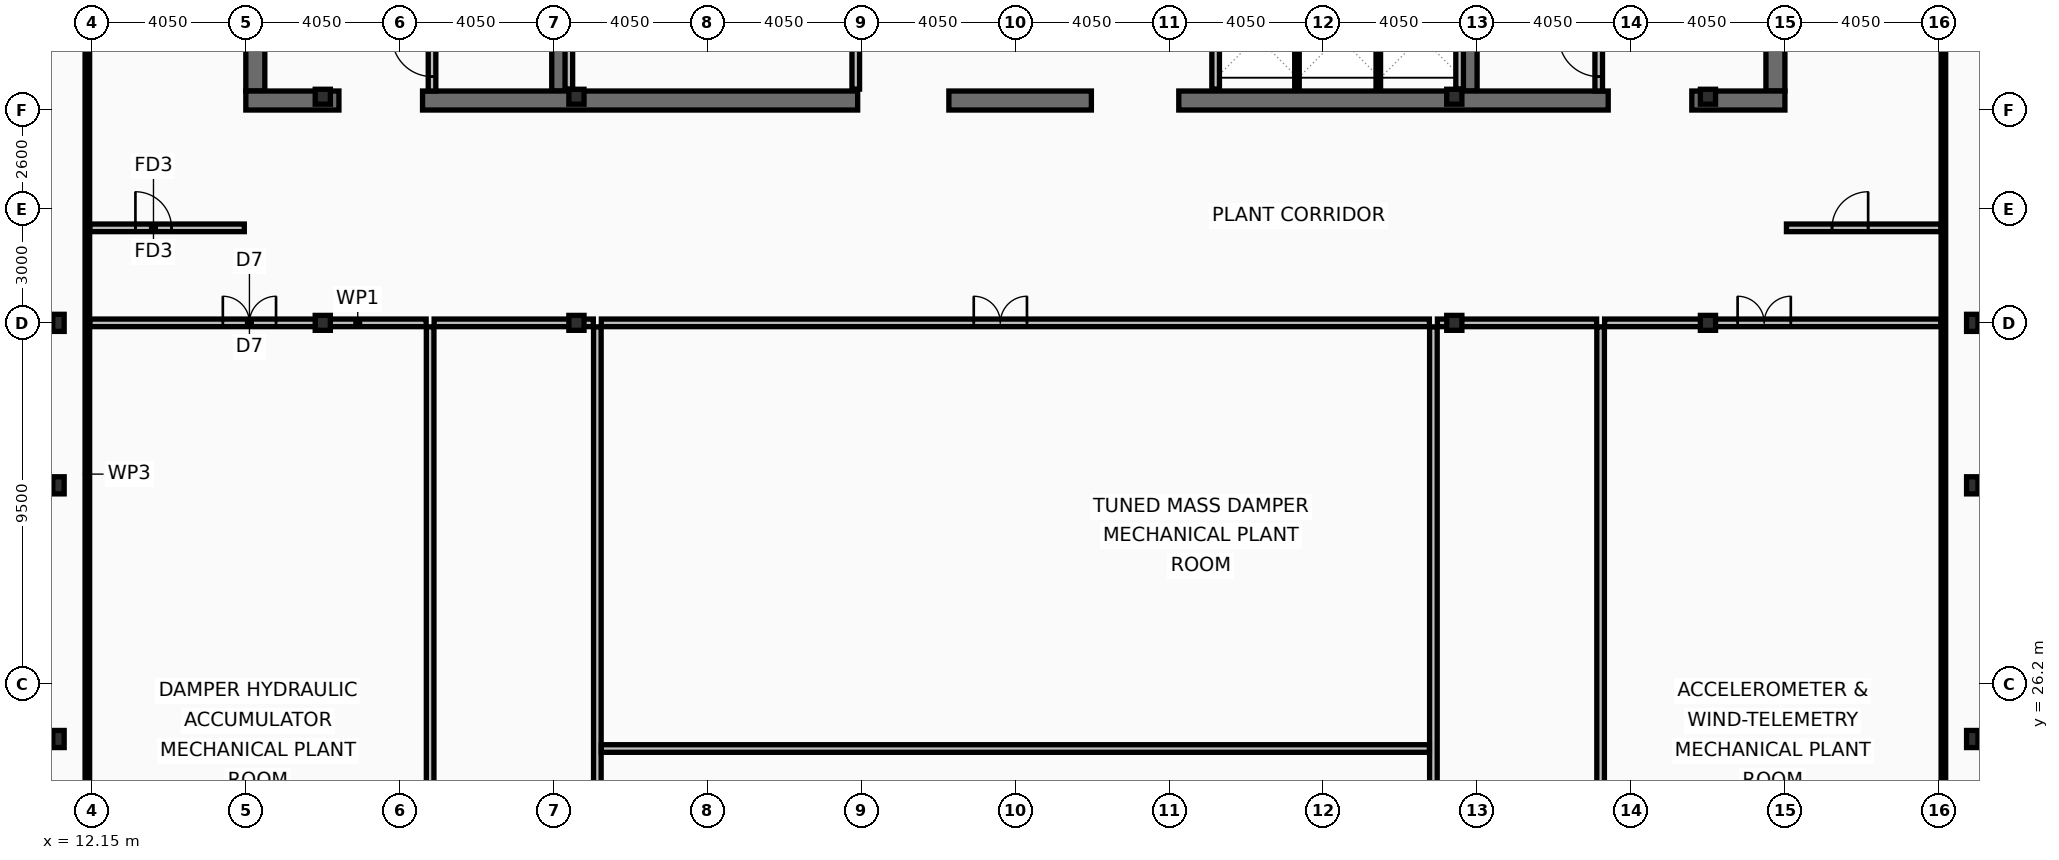
"""IFC4 building model, lengths in metres.
Left out: names, types, materials, properties, quantities, classifications, styles, units other than length and angle.
Written with IfcOpenShell. Run it as: python <this file> out.ifc"""

import sys

from ifc_helpers import new_model, si_unit, direction, frame, frame_2d, origin, origin_2d, place, context, subcontext, project, spatial, rectangle, i_section, extrude, element, fill, save


model = new_model("IFC4")
c1 = context("Model", 3, precision=1e-05, world=origin(), true_north=direction((0.0, 1.0)))
c2 = subcontext(c1, "Body", "Model", "MODEL_VIEW")
j1 = project(units=[si_unit("LENGTHUNIT", "METRE"), si_unit("PLANEANGLEUNIT", "RADIAN")], contexts=[c1])
p1 = place(None, origin())
s1 = spatial("IfcSite", under=j1, at=p1, CompositionType="ELEMENT")
p2 = place(p1, origin())
s2 = spatial("IfcBuilding", under=s1, at=p2, CompositionType="ELEMENT")
p3 = place(p2, frame((0.0, 0.0, 350.6)))
s3 = spatial("IfcBuildingStorey", under=s2, at=p3, CompositionType="ELEMENT", Elevation=350.6)
for number, where, z_axis, x_axis in (
    (1, (16.45, 41.8, 0.0), (0.0, 0.0, 1.0), (0.0, 1.0, 0.0)),
    (2, (56.45, 53.2, 0.0), (0.0, 0.0, 1.0), (0.0, -1.0, 0.0)),
):
    element("IfcWall", number, at=place(p3, frame(where, z_axis=z_axis, x_axis=x_axis)), inside=s3, PredefinedType="SHEAR", context=c2, shape_type="SweptSolid", body=[
        extrude(rectangle(XDim=11.4, YDim=0.5, at=frame_2d((5.7, 0.0))), origin(), (0.0, 0.0, 1.0), 5.4),
    ])
for number, where, z_axis, x_axis in (
    (3, (24.45, 41.8, 0.0), (0.0, 0.0, 1.0), (0.0, 1.0, 0.0)),
    (4, (48.4, 41.8, 0.0), (0.0, 0.0, 1.0), (0.0, 1.0, 0.0)),
):
    element("IfcWall", number, at=place(p3, frame(where, z_axis=z_axis, x_axis=x_axis)), inside=s3, PredefinedType="SHEAR", context=c2, shape_type="SweptSolid", body=[
        extrude(rectangle(XDim=11.4, YDim=0.4, at=frame_2d((5.7, 0.0))), origin(), (0.0, 0.0, 1.0), 5.4),
    ])
p4 = place(p3, frame((18.65, 41.55, 0.0), z_axis=(0.0, 0.0, 1.0), x_axis=(-1.0, 0.0, 0.0)))
e5 = element("IfcWall", 5, at=p4, inside=s3, PredefinedType="SHEAR", context=c2, shape_type="SweptSolid", body=[
    extrude(rectangle(XDim=2.45, YDim=0.5, at=frame_2d((1.225, 0.0))), origin(), (0.0, 0.0, 1.0), 5.4),
])
p5 = place(p3, frame((32.3, 41.55, 0.0), z_axis=(0.0, 0.0, 1.0), x_axis=(-1.0, 0.0, 0.0)))
e6 = element("IfcWall", 6, at=p5, inside=s3, PredefinedType="SHEAR", context=c2, shape_type="SweptSolid", body=[
    extrude(rectangle(XDim=11.45, YDim=0.5, at=frame_2d((5.725, 0.0))), origin(), (0.0, 0.0, 1.0), 5.4),
])
p6 = place(p3, frame((38.45, 41.55, 0.0), z_axis=(0.0, 0.0, 1.0), x_axis=(-1.0, 0.0, 0.0)))
e7 = element("IfcWall", 7, at=p6, inside=s3, PredefinedType="SHEAR", context=c2, shape_type="SweptSolid", body=[
    extrude(rectangle(XDim=3.75, YDim=0.5, at=frame_2d((1.875, 0.0))), origin(), (0.0, 0.0, 1.0), 5.4),
])
p7 = place(p3, frame((52.05, 41.55, 0.0), z_axis=(0.0, 0.0, 1.0), x_axis=(-1.0, 0.0, 0.0)))
e8 = element("IfcWall", 8, at=p7, inside=s3, PredefinedType="SHEAR", context=c2, shape_type="SweptSolid", body=[
    extrude(rectangle(XDim=11.3, YDim=0.5, at=frame_2d((5.65, 0.0))), origin(), (0.0, 0.0, 1.0), 5.4),
])
p8 = place(p3, frame((56.7, 41.55, 0.0), z_axis=(0.0, 0.0, 1.0), x_axis=(-1.0, 0.0, 0.0)))
e9 = element("IfcWall", 9, at=p8, inside=s3, PredefinedType="SHEAR", context=c2, shape_type="SweptSolid", body=[
    extrude(rectangle(XDim=2.45, YDim=0.5, at=frame_2d((1.225, 0.0))), origin(), (0.0, 0.0, 1.0), 5.4),
])
for number, where, z_axis, x_axis in (
    (10, (11.27, 24.75, 0.0), (0.0, 0.0, 1.0), (1.0, 0.0, 0.0)),
    (11, (11.27, 31.425, 0.0), (0.0, 0.0, 1.0), (1.0, 0.0, 0.0)),
    (12, (11.27, 35.7, 0.0), (0.0, 0.0, 1.0), (1.0, 0.0, 0.0)),
    (13, (61.63, 24.75, 0.0), (0.0, 0.0, 1.0), (1.0, 0.0, 0.0)),
    (14, (61.63, 31.425, 0.0), (0.0, 0.0, 1.0), (1.0, 0.0, 0.0)),
    (15, (61.63, 35.7, 0.0), (0.0, 0.0, 1.0), (1.0, 0.0, 0.0)),
):
    element("IfcColumn", number, at=place(p3, frame(where, z_axis=z_axis, x_axis=x_axis)), inside=s3, PredefinedType="COLUMN", context=c2, shape_type="SweptSolid", body=[
        extrude(i_section(OverallWidth=0.3, OverallDepth=0.45, WebThickness=0.014, FlangeThickness=0.026, at=origin_2d()), origin(), (0.0, 0.0, 1.0), 5.6),
    ])
for number, where, z_axis, x_axis in (
    (16, (18.225, 35.7, 0.0), (0.0, 0.0, 1.0), (1.0, 0.0, 0.0)),
    (17, (18.225, 41.65, 0.0), (0.0, 0.0, 1.0), (1.0, 0.0, 0.0)),
    (18, (24.9, 35.7, 0.0), (0.0, 0.0, 1.0), (1.0, 0.0, 0.0)),
    (19, (24.9, 41.65, 0.0), (0.0, 0.0, 1.0), (1.0, 0.0, 0.0)),
    (20, (48.0, 35.7, 0.0), (0.0, 0.0, 1.0), (1.0, 0.0, 0.0)),
    (21, (48.0, 41.65, 0.0), (0.0, 0.0, 1.0), (1.0, 0.0, 0.0)),
    (22, (54.675, 35.7, 0.0), (0.0, 0.0, 1.0), (1.0, 0.0, 0.0)),
    (23, (54.675, 41.65, 0.0), (0.0, 0.0, 1.0), (1.0, 0.0, 0.0)),
):
    element("IfcColumn", number, at=place(p3, frame(where, z_axis=z_axis, x_axis=x_axis)), inside=s3, PredefinedType="COLUMN", context=c2, shape_type="SweptSolid", body=[
        extrude(i_section(OverallWidth=0.399, OverallDepth=0.393, WebThickness=0.023, FlangeThickness=0.037, at=origin_2d()), origin(), (0.0, 0.0, 1.0), 5.6),
    ])
p9 = place(p3, frame((21.1, 41.8, 0.0), z_axis=(0.0, 0.0, 1.0), x_axis=(0.0, 1.0, 0.0)))
e24 = element("IfcWall", 24, at=p9, inside=s3, PredefinedType="PARTITIONING", context=c2, shape_type="SweptSolid", body=[
    extrude(rectangle(XDim=2.695, YDim=0.2, at=frame_2d((1.348, 0.0))), origin(), (0.0, 0.0, 1.0), 5.4),
])
p10 = place(p9, frame((0.38, 0.0, 0.0)))
e25 = element("IfcOpeningElement", 25, at=p10, cuts=e24, PredefinedType="OPENING", context=c2, shape_type="SweptSolid", body=[
    extrude(rectangle(XDim=1.05, YDim=2.15, at=frame_2d((0.525, 1.075))), frame((0.0, 0.11, 0.0), z_axis=(0.0, -1.0, 0.0), x_axis=(1.0, 0.0, 0.0)), (0.0, 0.0, 1.0), 0.22),
])
p11 = place(p3, frame((51.8, 41.8, 0.0), z_axis=(0.0, 0.0, 1.0), x_axis=(0.0, 1.0, 0.0)))
e26 = element("IfcWall", 26, at=p11, inside=s3, PredefinedType="PARTITIONING", context=c2, shape_type="SweptSolid", body=[
    extrude(rectangle(XDim=2.695, YDim=0.2, at=frame_2d((1.348, 0.0))), origin(), (0.0, 0.0, 1.0), 5.4),
])
p12 = place(p11, frame((0.38, 0.0, 0.0)))
e27 = element("IfcOpeningElement", 27, at=p12, cuts=e26, PredefinedType="OPENING", context=c2, shape_type="SweptSolid", body=[
    extrude(rectangle(XDim=1.05, YDim=2.15, at=frame_2d((0.525, 1.075))), frame((0.0, 0.11, 0.0), z_axis=(0.0, -1.0, 0.0), x_axis=(1.0, 0.0, 0.0)), (0.0, 0.0, 1.0), 0.22),
])
for number, where, z_axis, x_axis in (
    (28, (24.7, 41.85, 0.0), (0.0, 0.0, 1.0), (0.0, 1.0, 0.0)),
    (29, (32.25, 41.85, 0.0), (0.0, 0.0, 1.0), (0.0, 1.0, 0.0)),
    (30, (41.72, 41.85, 0.0), (0.0, 0.0, 1.0), (0.0, 1.0, 0.0)),
    (31, (48.14, 41.85, 0.0), (0.0, 0.0, 1.0), (0.0, 1.0, 0.0)),
):
    element("IfcWall", number, at=place(p3, frame(where, z_axis=z_axis, x_axis=x_axis)), inside=s3, PredefinedType="PARTITIONING", context=c2, shape_type="SweptSolid", body=[
        extrude(rectangle(XDim=2.395, YDim=0.2, at=frame_2d((1.198, 0.0))), origin(), (0.0, 0.0, 1.0), 5.4),
    ])
for number, where, z_axis, x_axis in (
    (32, (43.86, 41.85, 0.0), (0.0, 0.0, 1.0), (0.0, 1.0, 0.0)),
    (33, (46.0, 41.85, 0.0), (0.0, 0.0, 1.0), (0.0, 1.0, 0.0)),
):
    element("IfcWall", number, at=place(p3, frame(where, z_axis=z_axis, x_axis=x_axis)), inside=s3, PredefinedType="PARTITIONING", context=c2, shape_type="SweptSolid", body=[
        extrude(rectangle(XDim=2.395, YDim=0.12, at=frame_2d((1.198, 0.0))), origin(), (0.0, 0.0, 1.0), 5.4),
    ])
p13 = place(p3, frame((12.095, 35.7, 0.0), z_axis=(0.0, 0.0, 1.0), x_axis=(1.0, 0.0, 0.0)))
e34 = element("IfcWall", 34, at=p13, inside=s3, PredefinedType="PARTITIONING", context=c2, shape_type="SweptSolid", body=[
    extrude(rectangle(XDim=8.85, YDim=0.2, at=frame_2d((4.425, 0.0))), origin(), (0.0, 0.0, 1.0), 4.79),
])
p14 = place(p13, frame((3.5, 0.0, 0.0)))
e35 = element("IfcOpeningElement", 35, at=p14, cuts=e34, PredefinedType="OPENING", context=c2, shape_type="SweptSolid", body=[
    extrude(rectangle(XDim=1.4, YDim=2.15, at=frame_2d((0.7, 1.075))), frame((0.0, 0.11, 0.0), z_axis=(0.0, -1.0, 0.0), x_axis=(1.0, 0.0, 0.0)), (0.0, 0.0, 1.0), 0.22),
])
p15 = place(p3, frame((21.155, 35.7, 0.0), z_axis=(0.0, 0.0, 1.0), x_axis=(1.0, 0.0, 0.0)))
e36 = element("IfcWall", 36, at=p15, inside=s3, PredefinedType="PARTITIONING", context=c2, shape_type="SweptSolid", body=[
    extrude(rectangle(XDim=4.19, YDim=0.2, at=frame_2d((2.095, 0.0))), origin(), (0.0, 0.0, 1.0), 4.79),
])
p16 = place(p3, frame((25.555, 35.7, 0.0), z_axis=(0.0, 0.0, 1.0), x_axis=(1.0, 0.0, 0.0)))
e37 = element("IfcWall", 37, at=p16, inside=s3, PredefinedType="PARTITIONING", context=c2, shape_type="SweptSolid", body=[
    extrude(rectangle(XDim=21.79, YDim=0.2, at=frame_2d((10.895, 0.0))), origin(), (0.0, 0.0, 1.0), 5.03),
])
p17 = place(p16, frame((9.8, 0.0, 0.0)))
e38 = element("IfcOpeningElement", 38, at=p17, cuts=e37, PredefinedType="OPENING", context=c2, shape_type="SweptSolid", body=[
    extrude(rectangle(XDim=1.4, YDim=2.15, at=frame_2d((0.7, 1.075))), frame((0.0, 0.11, 0.0), z_axis=(0.0, -1.0, 0.0), x_axis=(1.0, 0.0, 0.0)), (0.0, 0.0, 1.0), 0.22),
])
p18 = place(p3, frame((47.555, 35.7, 0.0), z_axis=(0.0, 0.0, 1.0), x_axis=(1.0, 0.0, 0.0)))
e39 = element("IfcWall", 39, at=p18, inside=s3, PredefinedType="PARTITIONING", context=c2, shape_type="SweptSolid", body=[
    extrude(rectangle(XDim=4.19, YDim=0.2, at=frame_2d((2.095, 0.0))), origin(), (0.0, 0.0, 1.0), 4.79),
])
p19 = place(p3, frame((51.955, 35.7, 0.0), z_axis=(0.0, 0.0, 1.0), x_axis=(1.0, 0.0, 0.0)))
e40 = element("IfcWall", 40, at=p19, inside=s3, PredefinedType="PARTITIONING", context=c2, shape_type="SweptSolid", body=[
    extrude(rectangle(XDim=8.85, YDim=0.2, at=frame_2d((4.425, 0.0))), origin(), (0.0, 0.0, 1.0), 4.79),
])
p20 = place(p19, frame((3.5, 0.0, 0.0)))
e41 = element("IfcOpeningElement", 41, at=p20, cuts=e40, PredefinedType="OPENING", context=c2, shape_type="SweptSolid", body=[
    extrude(rectangle(XDim=1.4, YDim=2.15, at=frame_2d((0.7, 1.075))), frame((0.0, 0.11, 0.0), z_axis=(0.0, -1.0, 0.0), x_axis=(1.0, 0.0, 0.0)), (0.0, 0.0, 1.0), 0.22),
])
p21 = place(p3, frame((21.05, 10.565, 0.0), z_axis=(0.0, 0.0, 1.0), x_axis=(0.0, 1.0, 0.0)))
e42 = element("IfcWall", 42, at=p21, inside=s3, PredefinedType="PARTITIONING", context=c2, shape_type="SweptSolid", body=[
    extrude(rectangle(XDim=25.03, YDim=0.2, at=frame_2d((12.515, 0.0))), origin(), (0.0, 0.0, 1.0), 4.59),
])
for number, where, z_axis, x_axis in (
    (43, (25.45, 10.565, 0.0), (0.0, 0.0, 1.0), (0.0, 1.0, 0.0)),
    (44, (47.45, 10.565, 0.0), (0.0, 0.0, 1.0), (0.0, 1.0, 0.0)),
):
    element("IfcWall", number, at=place(p3, frame(where, z_axis=z_axis, x_axis=x_axis)), inside=s3, PredefinedType="PARTITIONING", context=c2, shape_type="SweptSolid", body=[
        extrude(rectangle(XDim=25.03, YDim=0.2, at=frame_2d((12.515, 0.0))), origin(), (0.0, 0.0, 1.0), 4.79),
    ])
p22 = place(p3, frame((51.85, 10.565, 0.0), z_axis=(0.0, 0.0, 1.0), x_axis=(0.0, 1.0, 0.0)))
e45 = element("IfcWall", 45, at=p22, inside=s3, PredefinedType="PARTITIONING", context=c2, shape_type="SweptSolid", body=[
    extrude(rectangle(XDim=25.03, YDim=0.2, at=frame_2d((12.515, 0.0))), origin(), (0.0, 0.0, 1.0), 4.59),
])
p23 = place(p3, frame((25.555, 24.5, 0.0), z_axis=(0.0, 0.0, 1.0), x_axis=(1.0, 0.0, 0.0)))
e46 = element("IfcWall", 46, at=p23, inside=s3, PredefinedType="PARTITIONING", context=c2, shape_type="SweptSolid", body=[
    extrude(rectangle(XDim=21.79, YDim=0.2, at=frame_2d((10.895, 0.0))), origin(), (0.0, 0.0, 1.0), 5.4),
])
p24 = place(p3, frame((12.095, 38.2, 0.0), z_axis=(0.0, 0.0, 1.0), x_axis=(1.0, 0.0, 0.0)))
e47 = element("IfcWall", 47, at=p24, inside=s3, PredefinedType="PARTITIONING", context=c2, shape_type="SweptSolid", body=[
    extrude(rectangle(XDim=4.065, YDim=0.2, at=frame_2d((2.032, 0.0))), origin(), (0.0, 0.0, 1.0), 5.4),
])
p25 = place(p24, frame((1.2, 0.0, 0.0)))
e48 = element("IfcOpeningElement", 48, at=p25, cuts=e47, PredefinedType="OPENING", context=c2, shape_type="SweptSolid", body=[
    extrude(rectangle(XDim=0.95, YDim=2.1, at=frame_2d((0.475, 1.05))), frame((0.0, 0.11, 0.0), z_axis=(0.0, -1.0, 0.0), x_axis=(1.0, 0.0, 0.0)), (0.0, 0.0, 1.0), 0.22),
])
p26 = place(p3, frame((56.74, 38.2, 0.0), z_axis=(0.0, 0.0, 1.0), x_axis=(1.0, 0.0, 0.0)))
e49 = element("IfcWall", 49, at=p26, inside=s3, PredefinedType="PARTITIONING", context=c2, shape_type="SweptSolid", body=[
    extrude(rectangle(XDim=4.065, YDim=0.2, at=frame_2d((2.032, 0.0))), origin(), (0.0, 0.0, 1.0), 5.4),
])
p27 = place(p26, frame((1.2, 0.0, 0.0)))
e50 = element("IfcOpeningElement", 50, at=p27, cuts=e49, PredefinedType="OPENING", context=c2, shape_type="SweptSolid", body=[
    extrude(rectangle(XDim=0.95, YDim=2.1, at=frame_2d((0.475, 1.05))), frame((0.0, 0.11, 0.0), z_axis=(0.0, -1.0, 0.0), x_axis=(1.0, 0.0, 0.0)), (0.0, 0.0, 1.0), 0.22),
])
for number, where, z_axis, x_axis in (
    (51, (12.03, 10.665, 0.0), (0.0, 0.0, 1.0), (0.0, 1.0, 0.0)),
    (52, (60.87, 10.665, 0.0), (0.0, 0.0, 1.0), (0.0, 1.0, 0.0)),
):
    element("IfcWall", number, at=place(p3, frame(where, z_axis=z_axis, x_axis=x_axis)), inside=s3, PredefinedType="PARTITIONING", context=c2, shape_type="SweptSolid", body=[
        extrude(rectangle(XDim=42.11, YDim=0.12, at=frame_2d((21.055, 0.0))), origin(), (0.0, 0.0, 1.0), 4.79),
    ])
p28 = place(p10, origin())
e53 = element("IfcDoor", 53, at=p28, inside=s3, OperationType="SINGLE_SWING_RIGHT", PredefinedType="DOOR", context=c2, shape_type="SweptSolid", body=[
    extrude(rectangle(XDim=1.05, YDim=2.15, at=frame_2d((0.525, 1.075))), frame((0.0, 0.025, 0.0), z_axis=(0.0, -1.0, 0.0), x_axis=(1.0, 0.0, 0.0)), (0.0, 0.0, 1.0), 0.05),
])
fill(e25, e53)
p29 = place(p12, origin())
e54 = element("IfcDoor", 54, at=p29, inside=s3, OperationType="SINGLE_SWING_RIGHT", PredefinedType="DOOR", context=c2, shape_type="SweptSolid", body=[
    extrude(rectangle(XDim=1.05, YDim=2.15, at=frame_2d((0.525, 1.075))), frame((0.0, 0.025, 0.0), z_axis=(0.0, -1.0, 0.0), x_axis=(1.0, 0.0, 0.0)), (0.0, 0.0, 1.0), 0.05),
])
fill(e27, e54)
p30 = place(p14, origin())
e55 = element("IfcDoor", 55, at=p30, inside=s3, OperationType="DOUBLE_DOOR_SINGLE_SWING", PredefinedType="DOOR", context=c2, shape_type="SweptSolid", body=[
    extrude(rectangle(XDim=1.4, YDim=2.15, at=frame_2d((0.7, 1.075))), frame((0.0, 0.025, 0.0), z_axis=(0.0, -1.0, 0.0), x_axis=(1.0, 0.0, 0.0)), (0.0, 0.0, 1.0), 0.05),
])
fill(e35, e55)
p31 = place(p17, origin())
e56 = element("IfcDoor", 56, at=p31, inside=s3, OperationType="DOUBLE_DOOR_SINGLE_SWING", PredefinedType="DOOR", context=c2, shape_type="SweptSolid", body=[
    extrude(rectangle(XDim=1.4, YDim=2.15, at=frame_2d((0.7, 1.075))), frame((0.0, 0.025, 0.0), z_axis=(0.0, -1.0, 0.0), x_axis=(1.0, 0.0, 0.0)), (0.0, 0.0, 1.0), 0.05),
])
fill(e38, e56)
p32 = place(p20, origin())
e57 = element("IfcDoor", 57, at=p32, inside=s3, OperationType="DOUBLE_DOOR_SINGLE_SWING", PredefinedType="DOOR", context=c2, shape_type="SweptSolid", body=[
    extrude(rectangle(XDim=1.4, YDim=2.15, at=frame_2d((0.7, 1.075))), frame((0.0, 0.025, 0.0), z_axis=(0.0, -1.0, 0.0), x_axis=(1.0, 0.0, 0.0)), (0.0, 0.0, 1.0), 0.05),
])
fill(e41, e57)
p33 = place(p25, origin())
e58 = element("IfcDoor", 58, at=p33, inside=s3, OperationType="SINGLE_SWING_LEFT", PredefinedType="DOOR", context=c2, shape_type="SweptSolid", body=[
    extrude(rectangle(XDim=0.95, YDim=2.1, at=frame_2d((0.475, 1.05))), frame((0.0, 0.025, 0.0), z_axis=(0.0, -1.0, 0.0), x_axis=(1.0, 0.0, 0.0)), (0.0, 0.0, 1.0), 0.05),
])
fill(e48, e58)
p34 = place(p27, origin())
e59 = element("IfcDoor", 59, at=p34, inside=s3, OperationType="SINGLE_SWING_RIGHT", PredefinedType="DOOR", context=c2, shape_type="SweptSolid", body=[
    extrude(rectangle(XDim=0.95, YDim=2.1, at=frame_2d((0.475, 1.05))), frame((0.0, 0.025, 0.0), z_axis=(0.0, -1.0, 0.0), x_axis=(1.0, 0.0, 0.0)), (0.0, 0.0, 1.0), 0.05),
])
fill(e50, e59)
save(model, sys.argv[1])
